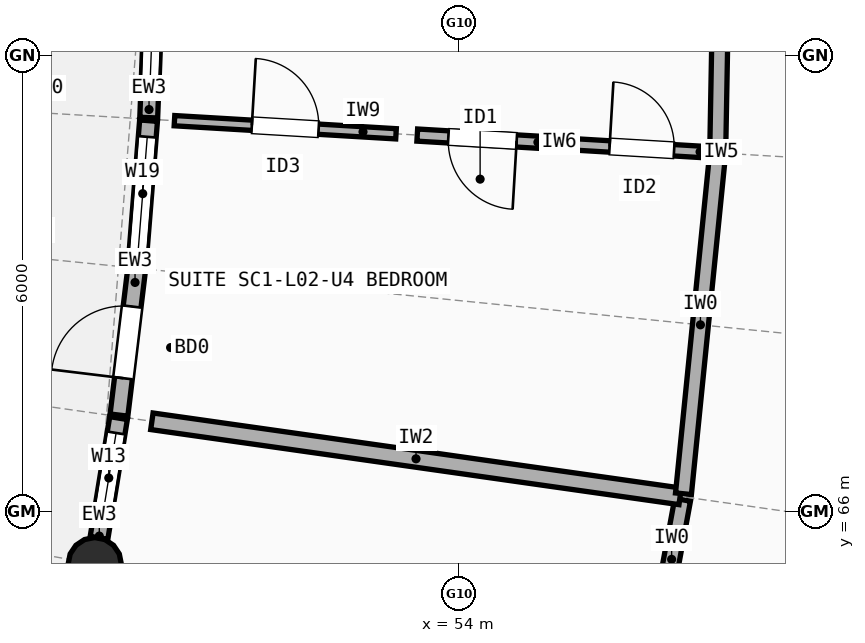
"""IFC4 building model, lengths in metres.
Left out: names, types, materials, properties, quantities, classifications, styles, units other than length and angle.
Written with IfcOpenShell. Run it as: python <this file> out.ifc"""

import sys

from ifc_helpers import new_model, si_unit, direction, frame, frame_2d, origin, origin_2d, place, context, subcontext, project, spatial, rectangle, circle, extrude, element, fill, save


model = new_model("IFC4")
c1 = context("Model", 3, precision=1e-05, world=origin(), true_north=direction((0.0, 1.0)))
c2 = subcontext(c1, "Body", "Model", "MODEL_VIEW")
j1 = project(units=[si_unit("LENGTHUNIT", "METRE"), si_unit("PLANEANGLEUNIT", "RADIAN")], contexts=[c1])
p1 = place(None, origin())
s1 = spatial("IfcSite", under=j1, at=p1, CompositionType="ELEMENT")
p2 = place(p1, origin())
s2 = spatial("IfcBuilding", under=s1, at=p2, CompositionType="ELEMENT")
p3 = place(p2, frame((0.0, 0.0, 7.7)))
s3 = spatial("IfcBuildingStorey", under=s2, at=p3, CompositionType="ELEMENT", Elevation=7.7)
p4 = place(p3, frame((49.206, 65.306, 0.0), z_axis=(0.0, 0.0, 1.0), x_axis=(1.0, 0.0, 0.0)))
e1 = element("IfcColumn", 1, at=p4, inside=s3, PredefinedType="COLUMN", context=c2, shape_type="SweptSolid", body=[
    extrude(circle(Radius=0.35, at=origin_2d()), origin(), (0.0, 0.0, 1.0), 2.948),
])
p5 = place(p3, frame((49.262, 65.652, 0.0), z_axis=(0.0, 0.0, 1.0), x_axis=(0.16100120568, 0.986954209561, 0.0)))
e2 = element("IfcWall", 2, at=p5, inside=s3, PredefinedType="STANDARD", context=c2, shape_type="SweptSolid", body=[
    extrude(rectangle(XDim=1.597, YDim=0.235, at=frame_2d((0.798, 0.0))), origin(), (0.0, 0.0, 1.0), 2.684),
])
p6 = place(p5, frame((0.198, 0.0, 0.85)))
e3 = element("IfcOpeningElement", 3, at=p6, cuts=e2, PredefinedType="OPENING", context=c2, shape_type="SweptSolid", body=[
    extrude(rectangle(XDim=1.2, YDim=1.45, at=frame_2d((0.6, 0.725))), frame((0.0, 0.127, 0.0), z_axis=(0.0, -1.0, 0.0), x_axis=(1.0, 0.0, 0.0)), (0.0, 0.0, 1.0), 0.255),
])
p7 = place(p3, frame((49.525, 67.268, 0.0), z_axis=(0.0, 0.0, 1.0), x_axis=(0.120384349076, 0.992727358592, 0.0)))
e4 = element("IfcWall", 4, at=p7, inside=s3, PredefinedType="STANDARD", context=c2, shape_type="SweptSolid", body=[
    extrude(rectangle(XDim=1.927, YDim=0.235, at=frame_2d((0.963, 0.0))), origin(), (0.0, 0.0, 1.0), 2.684),
])
p8 = place(p7, frame((0.488, 0.0, 0.0)))
e5 = element("IfcOpeningElement", 5, at=p8, cuts=e4, PredefinedType="OPENING", context=c2, shape_type="SweptSolid", body=[
    extrude(rectangle(XDim=0.95, YDim=2.12, at=frame_2d((0.475, 1.06))), frame((0.0, 0.127, 0.0), z_axis=(0.0, -1.0, 0.0), x_axis=(1.0, 0.0, 0.0)), (0.0, 0.0, 1.0), 0.255),
])
p9 = place(p3, frame((49.761, 69.22, 0.0), z_axis=(0.0, 0.0, 1.0), x_axis=(0.079573991137, 0.996828962227, 0.0)))
e6 = element("IfcWall", 6, at=p9, inside=s3, PredefinedType="STANDARD", context=c2, shape_type="SweptSolid", body=[
    extrude(rectangle(XDim=1.927, YDim=0.235, at=frame_2d((0.963, 0.0))), origin(), (0.0, 0.0, 1.0), 2.948),
])
p10 = place(p9, frame((0.213, 0.0, 0.85)))
e7 = element("IfcOpeningElement", 7, at=p10, cuts=e6, PredefinedType="OPENING", context=c2, shape_type="SweptSolid", body=[
    extrude(rectangle(XDim=1.5, YDim=1.5, at=frame_2d((0.75, 0.75))), frame((0.0, 0.127, 0.0), z_axis=(0.0, -1.0, 0.0), x_axis=(1.0, 0.0, 0.0)), (0.0, 0.0, 1.0), 0.255),
])
p11 = place(p3, frame((49.917, 71.181, 0.0), z_axis=(0.0, 0.0, 1.0), x_axis=(0.038647240614, 0.999252916329, 0.0)))
e8 = element("IfcWall", 8, at=p11, inside=s3, PredefinedType="STANDARD", context=c2, shape_type="SweptSolid", body=[
    extrude(rectangle(XDim=1.927, YDim=0.235, at=frame_2d((0.963, 0.0))), origin(), (0.0, 0.0, 1.0), 2.684),
])
p12 = place(p11, frame((0.363, 0.0, 0.85)))
e9 = element("IfcOpeningElement", 9, at=p12, cuts=e8, PredefinedType="OPENING", context=c2, shape_type="SweptSolid", body=[
    extrude(rectangle(XDim=1.2, YDim=1.5, at=frame_2d((0.6, 0.75))), frame((0.0, 0.127, 0.0), z_axis=(0.0, -1.0, 0.0), x_axis=(1.0, 0.0, 0.0)), (0.0, 0.0, 1.0), 0.255),
])
p13 = place(p3, frame((56.132, 61.76, 0.0), z_axis=(0.0, 0.0, 1.0), x_axis=(0.181159647639, 0.983453701029, 0.0)))
e10 = element("IfcWall", 10, at=p13, inside=s3, PredefinedType="SOLIDWALL", context=c2, shape_type="SweptSolid", body=[
    extrude(rectangle(XDim=4.468, YDim=0.21, at=frame_2d((2.234, 0.0))), origin(), (0.0, 0.0, 1.0), 2.722),
])
p14 = place(p13, frame((1.744, 0.0, 0.0)))
e11 = element("IfcOpeningElement", 11, at=p14, cuts=e10, PredefinedType="OPENING", context=c2, shape_type="SweptSolid", body=[
    extrude(rectangle(XDim=0.98, YDim=2.15, at=frame_2d((0.49, 1.075))), frame((0.0, 0.115, 0.0), z_axis=(0.0, -1.0, 0.0), x_axis=(1.0, 0.0, 0.0)), (0.0, 0.0, 1.0), 0.23),
])
p15 = place(p3, frame((49.958, 67.186, 0.0), z_axis=(0.0, 0.0, 1.0), x_axis=(0.990050789243, -0.140710464145, 0.0)))
e12 = element("IfcWall", 12, at=p15, inside=s3, PredefinedType="SOLIDWALL", context=c2, shape_type="SweptSolid", body=[
    extrude(rectangle(XDim=7.02, YDim=0.22, at=frame_2d((3.51, 0.0))), origin(), (0.0, 0.0, 1.0), 2.742),
])
p16 = place(p3, frame((56.952, 66.232, 0.0), z_axis=(0.0, 0.0, 1.0), x_axis=(0.099963674738, 0.994991087263, 0.0)))
e13 = element("IfcWall", 13, at=p16, inside=s3, PredefinedType="SOLIDWALL", context=c2, shape_type="SweptSolid", body=[
    extrude(rectangle(XDim=4.467, YDim=0.21, at=frame_2d((2.233, 0.0))), origin(), (0.0, 0.0, 1.0), 2.762),
])
p17 = place(p3, frame((57.404, 70.757, 0.0), z_axis=(0.0, 0.0, 1.0), x_axis=(0.018198680075, 0.999834390308, 0.0)))
e14 = element("IfcWall", 14, at=p17, inside=s3, PredefinedType="SOLIDWALL", context=c2, shape_type="SweptSolid", body=[
    extrude(rectangle(XDim=4.467, YDim=0.21, at=frame_2d((2.234, 0.0))), origin(), (0.0, 0.0, 1.0), 2.742),
])
p18 = place(p17, frame((1.708, 0.0, 0.0)))
e15 = element("IfcOpeningElement", 15, at=p18, cuts=e14, PredefinedType="OPENING", context=c2, shape_type="SweptSolid", body=[
    extrude(rectangle(XDim=1.05, YDim=2.15, at=frame_2d((0.525, 1.075))), frame((0.0, 0.115, 0.0), z_axis=(0.0, -1.0, 0.0), x_axis=(1.0, 0.0, 0.0)), (0.0, 0.0, 1.0), 0.23),
])
p19 = place(p3, frame((50.255, 71.14, 0.0), z_axis=(0.0, 0.0, 1.0), x_axis=(0.998251230611, -0.05911413184, 0.0)))
e16 = element("IfcWall", 16, at=p19, inside=s3, PredefinedType="PARTITIONING", context=c2, shape_type="SweptSolid", body=[
    extrude(rectangle(XDim=2.92, YDim=0.135, at=frame_2d((1.46, 0.0))), origin(), (0.0, 0.0, 1.0), 2.722),
])
p20 = place(p19, frame((1.02, 0.0, 0.0)))
e17 = element("IfcOpeningElement", 17, at=p20, cuts=e16, PredefinedType="OPENING", context=c2, shape_type="SweptSolid", body=[
    extrude(rectangle(XDim=0.88, YDim=2.1, at=frame_2d((0.44, 1.05))), frame((0.0, 0.077, 0.0), z_axis=(0.0, -1.0, 0.0), x_axis=(1.0, 0.0, 0.0)), (0.0, 0.0, 1.0), 0.155),
])
p21 = place(p3, frame((53.45, 70.951, 0.0), z_axis=(0.0, 0.0, 1.0), x_axis=(0.998255232119, -0.059046520199, 0.0)))
e18 = element("IfcWall", 18, at=p21, inside=s3, PredefinedType="PLUMBINGWALL", context=c2, shape_type="SweptSolid", body=[
    extrude(rectangle(XDim=1.72, YDim=0.16, at=frame_2d((0.86, 0.0))), origin(), (0.0, 0.0, 1.0), 2.722),
])
p22 = place(p21, frame((0.41, 0.0, 0.0)))
e19 = element("IfcOpeningElement", 19, at=p22, cuts=e18, PredefinedType="OPENING", context=c2, shape_type="SweptSolid", body=[
    extrude(rectangle(XDim=0.9, YDim=2.1, at=frame_2d((0.45, 1.05))), frame((0.0, 0.09, 0.0), z_axis=(0.0, -1.0, 0.0), x_axis=(1.0, 0.0, 0.0)), (0.0, 0.0, 1.0), 0.18),
])
p23 = place(p3, frame((55.446, 70.833, 0.0), z_axis=(0.0, 0.0, 1.0), x_axis=(0.998250171361, -0.05913201652, 0.0)))
e20 = element("IfcWall", 20, at=p23, inside=s3, PredefinedType="PARTITIONING", context=c2, shape_type="SweptSolid", body=[
    extrude(rectangle(XDim=1.92, YDim=0.15, at=frame_2d((0.96, 0.0))), origin(), (0.0, 0.0, 1.0), 2.722),
])
p24 = place(p23, frame((0.535, 0.0, 0.0)))
e21 = element("IfcOpeningElement", 21, at=p24, cuts=e20, PredefinedType="OPENING", context=c2, shape_type="SweptSolid", body=[
    extrude(rectangle(XDim=0.85, YDim=2.1, at=frame_2d((0.425, 1.05))), frame((0.0, 0.085, 0.0), z_axis=(0.0, -1.0, 0.0), x_axis=(1.0, 0.0, 0.0)), (0.0, 0.0, 1.0), 0.17),
])
p25 = place(p6, origin())
e22 = element("IfcWindow", 22, at=p25, inside=s3, PartitioningType="SINGLE_PANEL", PredefinedType="WINDOW", context=c2, shape_type="SweptSolid", body=[
    extrude(rectangle(XDim=1.2, YDim=1.45, at=frame_2d((0.6, 0.725))), frame((0.0, 0.03, 0.0), z_axis=(0.0, -1.0, 0.0), x_axis=(1.0, 0.0, 0.0)), (0.0, 0.0, 1.0), 0.06),
])
fill(e3, e22)
p26 = place(p8, origin())
e23 = element("IfcDoor", 23, at=p26, inside=s3, OperationType="SINGLE_SWING_LEFT", PredefinedType="DOOR", context=c2, shape_type="SweptSolid", body=[
    extrude(rectangle(XDim=0.95, YDim=2.12, at=frame_2d((0.475, 1.06))), frame((0.0, 0.025, 0.0), z_axis=(0.0, -1.0, 0.0), x_axis=(1.0, 0.0, 0.0)), (0.0, 0.0, 1.0), 0.05),
])
fill(e5, e23)
p27 = place(p10, origin())
e24 = element("IfcWindow", 24, at=p27, inside=s3, PartitioningType="SINGLE_PANEL", PredefinedType="WINDOW", context=c2, shape_type="SweptSolid", body=[
    extrude(rectangle(XDim=1.5, YDim=1.5, at=frame_2d((0.75, 0.75))), frame((0.0, 0.03, 0.0), z_axis=(0.0, -1.0, 0.0), x_axis=(1.0, 0.0, 0.0)), (0.0, 0.0, 1.0), 0.06),
])
fill(e7, e24)
p28 = place(p12, origin())
e25 = element("IfcWindow", 25, at=p28, inside=s3, PartitioningType="SINGLE_PANEL", PredefinedType="WINDOW", context=c2, shape_type="SweptSolid", body=[
    extrude(rectangle(XDim=1.2, YDim=1.5, at=frame_2d((0.6, 0.75))), frame((0.0, 0.03, 0.0), z_axis=(0.0, -1.0, 0.0), x_axis=(1.0, 0.0, 0.0)), (0.0, 0.0, 1.0), 0.06),
])
fill(e9, e25)
p29 = place(p20, origin())
e26 = element("IfcDoor", 26, at=p29, inside=s3, OperationType="SINGLE_SWING_LEFT", PredefinedType="DOOR", context=c2, shape_type="SweptSolid", body=[
    extrude(rectangle(XDim=0.88, YDim=2.1, at=frame_2d((0.44, 1.05))), frame((0.0, 0.025, 0.0), z_axis=(0.0, -1.0, 0.0), x_axis=(1.0, 0.0, 0.0)), (0.0, 0.0, 1.0), 0.05),
])
fill(e17, e26)
p30 = place(p22, origin())
e27 = element("IfcDoor", 27, at=p30, inside=s3, OperationType="SINGLE_SWING_RIGHT", PredefinedType="DOOR", context=c2, shape_type="SweptSolid", body=[
    extrude(rectangle(XDim=0.9, YDim=2.1, at=frame_2d((0.45, 1.05))), frame((0.0, 0.025, 0.0), z_axis=(0.0, -1.0, 0.0), x_axis=(1.0, 0.0, 0.0)), (0.0, 0.0, 1.0), 0.05),
])
fill(e19, e27)
p31 = place(p24, origin())
e28 = element("IfcDoor", 28, at=p31, inside=s3, OperationType="SINGLE_SWING_LEFT", PredefinedType="DOOR", context=c2, shape_type="SweptSolid", body=[
    extrude(rectangle(XDim=0.85, YDim=2.1, at=frame_2d((0.425, 1.05))), frame((0.0, 0.025, 0.0), z_axis=(0.0, -1.0, 0.0), x_axis=(1.0, 0.0, 0.0)), (0.0, 0.0, 1.0), 0.05),
])
fill(e21, e28)
save(model, sys.argv[1])
